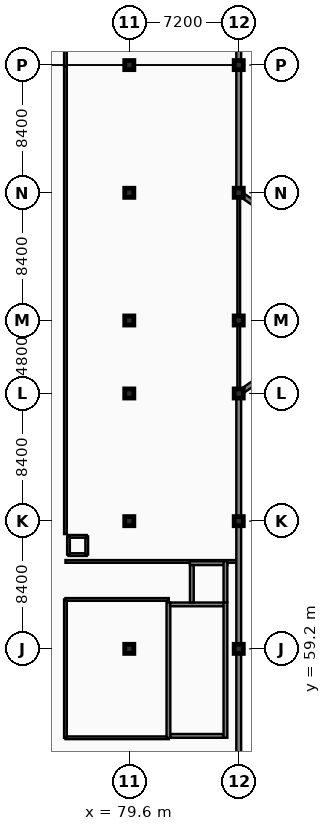
"""IFC4 building model, lengths in metres.
Left out: names, types, materials, properties, quantities, classifications, styles, units other than length and angle.
Written with IfcOpenShell. Run it as: python <this file> out.ifc"""

import sys

from ifc_helpers import new_model, si_unit, direction, frame, frame_2d, origin, origin_2d, place, context, subcontext, project, spatial, rectangle, extrude, element, fill, save


model = new_model("IFC4")
c1 = context("Model", 3, precision=1e-05, world=origin(), true_north=direction((0.0, 1.0)))
c2 = subcontext(c1, "Body", "Model", "MODEL_VIEW")
j1 = project(units=[si_unit("LENGTHUNIT", "METRE"), si_unit("PLANEANGLEUNIT", "RADIAN")], contexts=[c1])
p1 = place(None, origin())
s1 = spatial("IfcSite", under=j1, at=p1, CompositionType="ELEMENT")
p2 = place(p1, origin())
s2 = spatial("IfcBuilding", under=s1, at=p2, CompositionType="ELEMENT")
p3 = place(p2, origin())
s3 = spatial("IfcBuildingStorey", under=s2, at=p3, CompositionType="ELEMENT", Elevation=0.0)
for number, where, z_axis, x_axis in (
    (1, (79.6, 59.2, 0.0), (0.0, 0.0, 1.0), (1.0, 0.0, 0.0)),
    (2, (79.6, 67.6, 0.0), (0.0, 0.0, 1.0), (1.0, 0.0, 0.0)),
    (3, (79.6, 76.0, 0.0), (0.0, 0.0, 1.0), (1.0, 0.0, 0.0)),
    (4, (79.6, 80.8, 0.0), (0.0, 0.0, 1.0), (1.0, 0.0, 0.0)),
    (5, (79.6, 89.2, 0.0), (0.0, 0.0, 1.0), (1.0, 0.0, 0.0)),
    (6, (79.6, 97.6, 0.0), (0.0, 0.0, 1.0), (1.0, 0.0, 0.0)),
    (7, (86.8, 59.2, 0.0), (0.0, 0.0, 1.0), (1.0, 0.0, 0.0)),
    (8, (86.8, 67.6, 0.0), (0.0, 0.0, 1.0), (1.0, 0.0, 0.0)),
    (9, (86.8, 76.0, 0.0), (0.0, 0.0, 1.0), (1.0, 0.0, 0.0)),
    (10, (86.8, 80.8, 0.0), (0.0, 0.0, 1.0), (1.0, 0.0, 0.0)),
    (11, (86.8, 89.2, 0.0), (0.0, 0.0, 1.0), (1.0, 0.0, 0.0)),
    (12, (86.8, 97.6, 0.0), (0.0, 0.0, 1.0), (1.0, 0.0, 0.0)),
):
    element("IfcColumn", number, at=place(p3, frame(where, z_axis=z_axis, x_axis=x_axis)), inside=s3, PredefinedType="COLUMN", context=c2, shape_type="SweptSolid", body=[
        extrude(rectangle(XDim=0.6, YDim=0.6, at=origin_2d()), origin(), (0.0, 0.0, 1.0), 5.4),
    ])
p4 = place(p3, frame((75.4, 53.35, 0.0), z_axis=(0.0, 0.0, 1.0), x_axis=(1.0, 0.0, 0.0)))
e13 = element("IfcWall", 13, at=p4, inside=s3, PredefinedType="PARTITIONING", context=c2, shape_type="SweptSolid", body=[
    extrude(rectangle(XDim=6.8, YDim=0.18, at=frame_2d((3.4, 0.0))), origin(), (0.0, 0.0, 1.0), 4.64),
])
p5 = place(p3, frame((75.4, 53.35, 0.0), z_axis=(0.0, 0.0, 1.0), x_axis=(0.0, 1.0, 0.0)))
e14 = element("IfcWall", 14, at=p5, inside=s3, PredefinedType="PARTITIONING", context=c2, shape_type="SweptSolid", body=[
    extrude(rectangle(XDim=9.1, YDim=0.18, at=frame_2d((4.55, 0.0))), origin(), (0.0, 0.0, 1.0), 4.54),
])
p6 = place(p5, frame((4.05, 0.0, -0.01)))
e15 = element("IfcOpeningElement", 15, at=p6, cuts=e14, PredefinedType="OPENING", context=c2, shape_type="SweptSolid", body=[
    extrude(rectangle(XDim=1.0, YDim=2.16, at=frame_2d((0.5, 1.08))), frame((0.0, 0.1, 0.0), z_axis=(0.0, -1.0, 0.0), x_axis=(1.0, 0.0, 0.0)), (0.0, 0.0, 1.0), 0.2),
])
p7 = place(p3, frame((75.4, 62.45, 0.0), z_axis=(0.0, 0.0, 1.0), x_axis=(1.0, 0.0, 0.0)))
e16 = element("IfcWall", 16, at=p7, inside=s3, PredefinedType="PARTITIONING", context=c2, shape_type="SweptSolid", body=[
    extrude(rectangle(XDim=6.8, YDim=0.18, at=frame_2d((3.4, 0.0))), origin(), (0.0, 0.0, 1.0), 4.64),
])
p8 = place(p3, frame((75.4, 64.95, 0.0), z_axis=(0.0, 0.0, 1.0), x_axis=(1.0, 0.0, 0.0)))
e17 = element("IfcWall", 17, at=p8, inside=s3, PredefinedType="PARTITIONING", context=c2, shape_type="SweptSolid", body=[
    extrude(rectangle(XDim=11.25, YDim=0.18, at=frame_2d((5.625, 0.0))), origin(), (0.0, 0.0, 1.0), 4.64),
])
p9 = place(p3, frame((75.4, 66.75, 0.0), z_axis=(0.0, 0.0, 1.0), x_axis=(0.0, 1.0, 0.0)))
e18 = element("IfcWall", 18, at=p9, inside=s3, PredefinedType="PARTITIONING", context=c2, shape_type="SweptSolid", body=[
    extrude(rectangle(XDim=30.75, YDim=0.18, at=frame_2d((15.375, 0.0))), origin(), (0.0, 0.0, 1.0), 4.54),
])
p10 = place(p9, frame((6.413, 0.0, -0.01)))
e19 = element("IfcOpeningElement", 19, at=p10, cuts=e18, PredefinedType="OPENING", context=c2, shape_type="SweptSolid", body=[
    extrude(rectangle(XDim=1.6, YDim=2.21, at=frame_2d((0.8, 1.105))), frame((0.0, 0.1, 0.0), z_axis=(0.0, -1.0, 0.0), x_axis=(1.0, 0.0, 0.0)), (0.0, 0.0, 1.0), 0.2),
])
p11 = place(p3, frame((75.4, 97.5, 0.0), z_axis=(0.0, 0.0, 1.0), x_axis=(0.0, 1.0, 0.0)))
e20 = element("IfcWall", 20, at=p11, inside=s3, PredefinedType="PARTITIONING", context=c2, shape_type="SweptSolid", body=[
    extrude(rectangle(XDim=8.35, YDim=0.18, at=frame_2d((4.175, 0.0))), origin(), (0.0, 0.0, 1.0), 4.54),
])
p12 = place(p3, frame((86.8, 76.0, 0.0), z_axis=(0.0, 0.0, 1.0), x_axis=(0.0, 1.0, 0.0)))
e21 = element("IfcWall", 21, at=p12, inside=s3, PredefinedType="PARTITIONING", context=c2, shape_type="SweptSolid", body=[
    extrude(rectangle(XDim=13.2, YDim=0.18, at=frame_2d((6.6, 0.0))), origin(), (0.0, 0.0, 1.0), 4.54),
])
p13 = place(p12, frame((5.8, 0.0, -0.01)))
e22 = element("IfcOpeningElement", 22, at=p13, cuts=e21, PredefinedType="OPENING", context=c2, shape_type="SweptSolid", body=[
    extrude(rectangle(XDim=1.6, YDim=2.21, at=frame_2d((0.8, 1.105))), frame((0.0, 0.1, 0.0), z_axis=(0.0, -1.0, 0.0), x_axis=(1.0, 0.0, 0.0)), (0.0, 0.0, 1.0), 0.2),
])
p14 = place(p3, frame((86.8, 97.6, 0.0), z_axis=(0.0, 0.0, 1.0), x_axis=(0.0, 1.0, 0.0)))
e23 = element("IfcWall", 23, at=p14, inside=s3, PredefinedType="SOLIDWALL", context=c2, shape_type="SweptSolid", body=[
    extrude(rectangle(XDim=8.4, YDim=0.32, at=frame_2d((4.2, 0.0))), origin(), (0.0, 0.0, 1.0), 4.54),
])
p15 = place(p14, frame((0.46, 0.0, 0.9)))
e24 = element("IfcOpeningElement", 24, at=p15, cuts=e23, PredefinedType="OPENING", context=c2, shape_type="SweptSolid", body=[
    extrude(rectangle(XDim=2.4, YDim=2.35, at=frame_2d((1.2, 1.175))), frame((0.0, 0.17, 0.0), z_axis=(0.0, -1.0, 0.0), x_axis=(1.0, 0.0, 0.0)), (0.0, 0.0, 1.0), 0.34),
])
p16 = place(p14, frame((5.46, 0.0, 0.9)))
e25 = element("IfcOpeningElement", 25, at=p16, cuts=e23, PredefinedType="OPENING", context=c2, shape_type="SweptSolid", body=[
    extrude(rectangle(XDim=2.4, YDim=2.35, at=frame_2d((1.2, 1.175))), frame((0.0, 0.17, 0.0), z_axis=(0.0, -1.0, 0.0), x_axis=(1.0, 0.0, 0.0)), (0.0, 0.0, 1.0), 0.34),
])
p17 = place(p3, frame((86.8, 50.8, 0.0), z_axis=(0.0, 0.0, 1.0), x_axis=(0.0, 1.0, 0.0)))
e26 = element("IfcWall", 26, at=p17, inside=s3, PredefinedType="SOLIDWALL", context=c2, shape_type="SweptSolid", body=[
    extrude(rectangle(XDim=8.4, YDim=0.32, at=frame_2d((4.2, 0.0))), origin(), (0.0, 0.0, 1.0), 4.64),
])
p18 = place(p17, frame((0.46, 0.0, 0.9)))
e27 = element("IfcOpeningElement", 27, at=p18, cuts=e26, PredefinedType="OPENING", context=c2, shape_type="SweptSolid", body=[
    extrude(rectangle(XDim=2.4, YDim=2.35, at=frame_2d((1.2, 1.175))), frame((0.0, 0.17, 0.0), z_axis=(0.0, -1.0, 0.0), x_axis=(1.0, 0.0, 0.0)), (0.0, 0.0, 1.0), 0.34),
])
p19 = place(p17, frame((5.46, 0.0, 0.9)))
e28 = element("IfcOpeningElement", 28, at=p19, cuts=e26, PredefinedType="OPENING", context=c2, shape_type="SweptSolid", body=[
    extrude(rectangle(XDim=2.4, YDim=2.35, at=frame_2d((1.2, 1.175))), frame((0.0, 0.17, 0.0), z_axis=(0.0, -1.0, 0.0), x_axis=(1.0, 0.0, 0.0)), (0.0, 0.0, 1.0), 0.34),
])
p20 = place(p3, frame((86.8, 59.2, 0.0), z_axis=(0.0, 0.0, 1.0), x_axis=(0.0, 1.0, 0.0)))
e29 = element("IfcWall", 29, at=p20, inside=s3, PredefinedType="SOLIDWALL", context=c2, shape_type="SweptSolid", body=[
    extrude(rectangle(XDim=8.4, YDim=0.32, at=frame_2d((4.2, 0.0))), origin(), (0.0, 0.0, 1.0), 4.54),
])
p21 = place(p20, frame((1.86, 0.0, 0.9)))
e30 = element("IfcOpeningElement", 30, at=p21, cuts=e29, PredefinedType="OPENING", context=c2, shape_type="SweptSolid", body=[
    extrude(rectangle(XDim=2.4, YDim=2.35, at=frame_2d((1.2, 1.175))), frame((0.0, 0.17, 0.0), z_axis=(0.0, -1.0, 0.0), x_axis=(1.0, 0.0, 0.0)), (0.0, 0.0, 1.0), 0.34),
])
p22 = place(p3, frame((86.8, 67.6, 0.0), z_axis=(0.0, 0.0, 1.0), x_axis=(0.0, 1.0, 0.0)))
e31 = element("IfcWall", 31, at=p22, inside=s3, PredefinedType="SOLIDWALL", context=c2, shape_type="SweptSolid", body=[
    extrude(rectangle(XDim=8.4, YDim=0.32, at=frame_2d((4.2, 0.0))), origin(), (0.0, 0.0, 1.0), 4.54),
])
p23 = place(p22, frame((0.46, 0.0, 0.9)))
e32 = element("IfcOpeningElement", 32, at=p23, cuts=e31, PredefinedType="OPENING", context=c2, shape_type="SweptSolid", body=[
    extrude(rectangle(XDim=2.4, YDim=2.35, at=frame_2d((1.2, 1.175))), frame((0.0, 0.17, 0.0), z_axis=(0.0, -1.0, 0.0), x_axis=(1.0, 0.0, 0.0)), (0.0, 0.0, 1.0), 0.34),
])
p24 = place(p22, frame((5.46, 0.0, 0.9)))
e33 = element("IfcOpeningElement", 33, at=p24, cuts=e31, PredefinedType="OPENING", context=c2, shape_type="SweptSolid", body=[
    extrude(rectangle(XDim=2.4, YDim=2.35, at=frame_2d((1.2, 1.175))), frame((0.0, 0.17, 0.0), z_axis=(0.0, -1.0, 0.0), x_axis=(1.0, 0.0, 0.0)), (0.0, 0.0, 1.0), 0.34),
])
p25 = place(p3, frame((86.8, 89.2, 0.0), z_axis=(0.0, 0.0, 1.0), x_axis=(0.0, 1.0, 0.0)))
e34 = element("IfcWall", 34, at=p25, inside=s3, PredefinedType="SOLIDWALL", context=c2, shape_type="SweptSolid", body=[
    extrude(rectangle(XDim=8.4, YDim=0.32, at=frame_2d((4.2, 0.0))), origin(), (0.0, 0.0, 1.0), 4.54),
])
p26 = place(p25, frame((0.46, 0.0, 0.9)))
e35 = element("IfcOpeningElement", 35, at=p26, cuts=e34, PredefinedType="OPENING", context=c2, shape_type="SweptSolid", body=[
    extrude(rectangle(XDim=2.4, YDim=2.35, at=frame_2d((1.2, 1.175))), frame((0.0, 0.17, 0.0), z_axis=(0.0, -1.0, 0.0), x_axis=(1.0, 0.0, 0.0)), (0.0, 0.0, 1.0), 0.34),
])
p27 = place(p25, frame((5.46, 0.0, 0.9)))
e36 = element("IfcOpeningElement", 36, at=p27, cuts=e34, PredefinedType="OPENING", context=c2, shape_type="SweptSolid", body=[
    extrude(rectangle(XDim=2.4, YDim=2.35, at=frame_2d((1.2, 1.175))), frame((0.0, 0.17, 0.0), z_axis=(0.0, -1.0, 0.0), x_axis=(1.0, 0.0, 0.0)), (0.0, 0.0, 1.0), 0.34),
])
p28 = place(p3, frame((86.8, 76.0, 0.0), z_axis=(0.0, 0.0, 1.0), x_axis=(0.8221699556, 0.569242096219, 0.0)))
e37 = element("IfcWall", 37, at=p28, inside=s3, PredefinedType="SOLIDWALL", context=c2, shape_type="SweptSolid", body=[
    extrude(rectangle(XDim=3.162, YDim=0.32, at=frame_2d((1.581, 0.0))), origin(), (0.0, 0.0, 1.0), 4.54),
])
p29 = place(p28, frame((1.06, 0.0, 0.9)))
e38 = element("IfcOpeningElement", 38, at=p29, cuts=e37, PredefinedType="OPENING", context=c2, shape_type="SweptSolid", body=[
    extrude(rectangle(XDim=1.2, YDim=2.35, at=frame_2d((0.6, 1.175))), frame((0.0, 0.17, 0.0), z_axis=(0.0, -1.0, 0.0), x_axis=(1.0, 0.0, 0.0)), (0.0, 0.0, 1.0), 0.34),
])
p30 = place(p3, frame((89.4, 87.4, 0.0), z_axis=(0.0, 0.0, 1.0), x_axis=(-0.8221699556, 0.569242096219, 0.0)))
e39 = element("IfcWall", 39, at=p30, inside=s3, PredefinedType="SOLIDWALL", context=c2, shape_type="SweptSolid", body=[
    extrude(rectangle(XDim=3.162, YDim=0.32, at=frame_2d((1.581, 0.0))), origin(), (0.0, 0.0, 1.0), 4.54),
])
p31 = place(p30, frame((1.06, 0.0, 0.9)))
e40 = element("IfcOpeningElement", 40, at=p31, cuts=e39, PredefinedType="OPENING", context=c2, shape_type="SweptSolid", body=[
    extrude(rectangle(XDim=1.2, YDim=2.35, at=frame_2d((0.6, 1.175))), frame((0.0, 0.17, 0.0), z_axis=(0.0, -1.0, 0.0), x_axis=(1.0, 0.0, 0.0)), (0.0, 0.0, 1.0), 0.34),
])
p32 = place(p3, frame((82.3, 53.475, 0.0), z_axis=(0.0, 0.0, 1.0), x_axis=(1.0, 0.0, 0.0)))
e41 = element("IfcWall", 41, at=p32, inside=s3, PredefinedType="SHEAR", context=c2, shape_type="SweptSolid", body=[
    extrude(rectangle(XDim=3.5, YDim=0.25, at=frame_2d((1.75, 0.0))), origin(), (0.0, 0.0, 1.0), 5.4),
])
p33 = place(p32, frame((1.1, 0.0, -0.01)))
e42 = element("IfcOpeningElement", 42, at=p33, cuts=e41, PredefinedType="OPENING", context=c2, shape_type="SweptSolid", body=[
    extrude(rectangle(XDim=1.3, YDim=2.16, at=frame_2d((0.65, 1.08))), frame((0.0, 0.135, 0.0), z_axis=(0.0, -1.0, 0.0), x_axis=(1.0, 0.0, 0.0)), (0.0, 0.0, 1.0), 0.27),
])
p34 = place(p3, frame((82.175, 53.35, 0.0), z_axis=(0.0, 0.0, 1.0), x_axis=(0.0, 1.0, 0.0)))
e43 = element("IfcWall", 43, at=p34, inside=s3, PredefinedType="SHEAR", context=c2, shape_type="SweptSolid", body=[
    extrude(rectangle(XDim=8.9, YDim=0.25, at=frame_2d((4.45, 0.0))), origin(), (0.0, 0.0, 1.0), 5.4),
])
p35 = place(p3, frame((85.8, 62.125, 0.0), z_axis=(0.0, 0.0, 1.0), x_axis=(-1.0, 0.0, 0.0)))
e44 = element("IfcWall", 44, at=p35, inside=s3, PredefinedType="SHEAR", context=c2, shape_type="SweptSolid", body=[
    extrude(rectangle(XDim=3.5, YDim=0.25, at=frame_2d((1.75, 0.0))), origin(), (0.0, 0.0, 1.0), 5.4),
])
p36 = place(p3, frame((85.925, 53.35, 0.0), z_axis=(0.0, 0.0, 1.0), x_axis=(0.0, 1.0, 0.0)))
e45 = element("IfcWall", 45, at=p36, inside=s3, PredefinedType="SHEAR", context=c2, shape_type="SweptSolid", body=[
    extrude(rectangle(XDim=8.9, YDim=0.25, at=frame_2d((4.45, 0.0))), origin(), (0.0, 0.0, 1.0), 5.4),
])
p37 = place(p3, frame((83.59, 64.835, 0.0), z_axis=(0.0, 0.0, 1.0), x_axis=(1.0, 0.0, 0.0)))
e46 = element("IfcWall", 46, at=p37, inside=s3, PredefinedType="SHEAR", context=c2, shape_type="SweptSolid", body=[
    extrude(rectangle(XDim=2.46, YDim=0.25, at=frame_2d((1.23, 0.0))), origin(), (0.0, 0.0, 1.0), 5.4),
])
p38 = place(p3, frame((83.715, 62.25, 0.0), z_axis=(0.0, 0.0, 1.0), x_axis=(0.0, 1.0, 0.0)))
e47 = element("IfcWall", 47, at=p38, inside=s3, PredefinedType="SHEAR", context=c2, shape_type="SweptSolid", body=[
    extrude(rectangle(XDim=2.46, YDim=0.25, at=frame_2d((1.23, 0.0))), origin(), (0.0, 0.0, 1.0), 5.4),
])
p39 = place(p38, frame((0.68, 0.0, -0.01)))
e48 = element("IfcOpeningElement", 48, at=p39, cuts=e47, PredefinedType="OPENING", context=c2, shape_type="SweptSolid", body=[
    extrude(rectangle(XDim=1.1, YDim=2.16, at=frame_2d((0.55, 1.08))), frame((0.0, 0.135, 0.0), z_axis=(0.0, -1.0, 0.0), x_axis=(1.0, 0.0, 0.0)), (0.0, 0.0, 1.0), 0.27),
])
p40 = place(p3, frame((85.925, 62.25, 0.0), z_axis=(0.0, 0.0, 1.0), x_axis=(0.0, 1.0, 0.0)))
e49 = element("IfcWall", 49, at=p40, inside=s3, PredefinedType="SHEAR", context=c2, shape_type="SweptSolid", body=[
    extrude(rectangle(XDim=2.71, YDim=0.25, at=frame_2d((1.355, 0.0))), origin(), (0.0, 0.0, 1.0), 5.4),
])
p41 = place(p3, frame((75.6, 65.4, 0.0), z_axis=(0.0, 0.0, 1.0), x_axis=(1.0, 0.0, 0.0)))
e50 = element("IfcWall", 50, at=p41, inside=s3, PredefinedType="SOLIDWALL", context=c2, shape_type="SweptSolid", body=[
    extrude(rectangle(XDim=1.2, YDim=0.18, at=frame_2d((0.6, 0.0))), origin(), (0.0, 0.0, 1.0), 5.07),
])
p42 = place(p3, frame((76.8, 65.4, 0.0), z_axis=(0.0, 0.0, 1.0), x_axis=(0.0, 1.0, 0.0)))
e51 = element("IfcWall", 51, at=p42, inside=s3, PredefinedType="SOLIDWALL", context=c2, shape_type="SweptSolid", body=[
    extrude(rectangle(XDim=1.2, YDim=0.18, at=frame_2d((0.6, 0.0))), origin(), (0.0, 0.0, 1.0), 5.07),
])
p43 = place(p3, frame((76.8, 66.6, 0.0), z_axis=(0.0, 0.0, 1.0), x_axis=(-1.0, 0.0, 0.0)))
e52 = element("IfcWall", 52, at=p43, inside=s3, PredefinedType="SOLIDWALL", context=c2, shape_type="SweptSolid", body=[
    extrude(rectangle(XDim=1.2, YDim=0.18, at=frame_2d((0.6, 0.0))), origin(), (0.0, 0.0, 1.0), 5.07),
])
p44 = place(p3, frame((75.6, 66.6, 0.0), z_axis=(0.0, 0.0, 1.0), x_axis=(0.0, -1.0, 0.0)))
e53 = element("IfcWall", 53, at=p44, inside=s3, PredefinedType="SOLIDWALL", context=c2, shape_type="SweptSolid", body=[
    extrude(rectangle(XDim=1.2, YDim=0.18, at=frame_2d((0.6, 0.0))), origin(), (0.0, 0.0, 1.0), 5.07),
])
p45 = place(p44, frame((0.2, 0.0, -0.01)))
e54 = element("IfcOpeningElement", 54, at=p45, cuts=e53, PredefinedType="OPENING", context=c2, shape_type="SweptSolid", body=[
    extrude(rectangle(XDim=0.8, YDim=2.06, at=frame_2d((0.4, 1.03))), frame((0.0, 0.1, 0.0), z_axis=(0.0, -1.0, 0.0), x_axis=(1.0, 0.0, 0.0)), (0.0, 0.0, 1.0), 0.2),
])
p46 = place(p6, frame((0.0, 0.0, 0.01)))
e55 = element("IfcDoor", 55, at=p46, inside=s3, OperationType="SINGLE_SWING_RIGHT", PredefinedType="DOOR", context=c2, shape_type="SweptSolid", body=[
    extrude(rectangle(XDim=1.0, YDim=2.15, at=frame_2d((0.5, 1.075))), frame((0.0, 0.025, 0.0), z_axis=(0.0, -1.0, 0.0), x_axis=(1.0, 0.0, 0.0)), (0.0, 0.0, 1.0), 0.05),
])
fill(e15, e55)
p47 = place(p10, frame((1.6, 0.0, 0.01), z_axis=(0.0, 0.0, 1.0), x_axis=(-1.0, 0.0, 0.0)))
e56 = element("IfcDoor", 56, at=p47, inside=s3, OperationType="DOUBLE_SWING_LEFT", PredefinedType="DOOR", context=c2, shape_type="SweptSolid", body=[
    extrude(rectangle(XDim=1.6, YDim=2.2, at=frame_2d((0.8, 1.1))), frame((0.0, 0.025, 0.0), z_axis=(0.0, -1.0, 0.0), x_axis=(1.0, 0.0, 0.0)), (0.0, 0.0, 1.0), 0.05),
])
fill(e19, e56)
p48 = place(p13, frame((0.0, 0.0, 0.01)))
e57 = element("IfcDoor", 57, at=p48, inside=s3, OperationType="DOUBLE_SWING_LEFT", PredefinedType="DOOR", context=c2, shape_type="SweptSolid", body=[
    extrude(rectangle(XDim=1.6, YDim=2.2, at=frame_2d((0.8, 1.1))), frame((0.0, 0.025, 0.0), z_axis=(0.0, -1.0, 0.0), x_axis=(1.0, 0.0, 0.0)), (0.0, 0.0, 1.0), 0.05),
])
fill(e22, e57)
p49 = place(p15, origin())
e58 = element("IfcWindow", 58, at=p49, inside=s3, PartitioningType="TRIPLE_PANEL_VERTICAL", PredefinedType="WINDOW", context=c2, shape_type="SweptSolid", body=[
    extrude(rectangle(XDim=2.4, YDim=2.35, at=frame_2d((1.2, 1.175))), frame((0.0, 0.03, 0.0), z_axis=(0.0, -1.0, 0.0), x_axis=(1.0, 0.0, 0.0)), (0.0, 0.0, 1.0), 0.06),
])
fill(e24, e58)
p50 = place(p18, origin())
e59 = element("IfcWindow", 59, at=p50, inside=s3, PartitioningType="TRIPLE_PANEL_VERTICAL", PredefinedType="WINDOW", context=c2, shape_type="SweptSolid", body=[
    extrude(rectangle(XDim=2.4, YDim=2.35, at=frame_2d((1.2, 1.175))), frame((0.0, 0.03, 0.0), z_axis=(0.0, -1.0, 0.0), x_axis=(1.0, 0.0, 0.0)), (0.0, 0.0, 1.0), 0.06),
])
fill(e27, e59)
p51 = place(p19, origin())
e60 = element("IfcWindow", 60, at=p51, inside=s3, PartitioningType="TRIPLE_PANEL_VERTICAL", PredefinedType="WINDOW", context=c2, shape_type="SweptSolid", body=[
    extrude(rectangle(XDim=2.4, YDim=2.35, at=frame_2d((1.2, 1.175))), frame((0.0, 0.03, 0.0), z_axis=(0.0, -1.0, 0.0), x_axis=(1.0, 0.0, 0.0)), (0.0, 0.0, 1.0), 0.06),
])
fill(e28, e60)
p52 = place(p21, origin())
e61 = element("IfcWindow", 61, at=p52, inside=s3, PartitioningType="TRIPLE_PANEL_VERTICAL", PredefinedType="WINDOW", context=c2, shape_type="SweptSolid", body=[
    extrude(rectangle(XDim=2.4, YDim=2.35, at=frame_2d((1.2, 1.175))), frame((0.0, 0.03, 0.0), z_axis=(0.0, -1.0, 0.0), x_axis=(1.0, 0.0, 0.0)), (0.0, 0.0, 1.0), 0.06),
])
fill(e30, e61)
p53 = place(p23, origin())
e62 = element("IfcWindow", 62, at=p53, inside=s3, PartitioningType="TRIPLE_PANEL_VERTICAL", PredefinedType="WINDOW", context=c2, shape_type="SweptSolid", body=[
    extrude(rectangle(XDim=2.4, YDim=2.35, at=frame_2d((1.2, 1.175))), frame((0.0, 0.03, 0.0), z_axis=(0.0, -1.0, 0.0), x_axis=(1.0, 0.0, 0.0)), (0.0, 0.0, 1.0), 0.06),
])
fill(e32, e62)
p54 = place(p24, origin())
e63 = element("IfcWindow", 63, at=p54, inside=s3, PartitioningType="TRIPLE_PANEL_VERTICAL", PredefinedType="WINDOW", context=c2, shape_type="SweptSolid", body=[
    extrude(rectangle(XDim=2.4, YDim=2.35, at=frame_2d((1.2, 1.175))), frame((0.0, 0.03, 0.0), z_axis=(0.0, -1.0, 0.0), x_axis=(1.0, 0.0, 0.0)), (0.0, 0.0, 1.0), 0.06),
])
fill(e33, e63)
p55 = place(p26, origin())
e64 = element("IfcWindow", 64, at=p55, inside=s3, PartitioningType="TRIPLE_PANEL_VERTICAL", PredefinedType="WINDOW", context=c2, shape_type="SweptSolid", body=[
    extrude(rectangle(XDim=2.4, YDim=2.35, at=frame_2d((1.2, 1.175))), frame((0.0, 0.03, 0.0), z_axis=(0.0, -1.0, 0.0), x_axis=(1.0, 0.0, 0.0)), (0.0, 0.0, 1.0), 0.06),
])
fill(e35, e64)
p56 = place(p27, origin())
e65 = element("IfcWindow", 65, at=p56, inside=s3, PartitioningType="TRIPLE_PANEL_VERTICAL", PredefinedType="WINDOW", context=c2, shape_type="SweptSolid", body=[
    extrude(rectangle(XDim=2.4, YDim=2.35, at=frame_2d((1.2, 1.175))), frame((0.0, 0.03, 0.0), z_axis=(0.0, -1.0, 0.0), x_axis=(1.0, 0.0, 0.0)), (0.0, 0.0, 1.0), 0.06),
])
fill(e36, e65)
p57 = place(p31, origin())
e66 = element("IfcWindow", 66, at=p57, inside=s3, PartitioningType="SINGLE_PANEL", PredefinedType="WINDOW", context=c2, shape_type="SweptSolid", body=[
    extrude(rectangle(XDim=1.2, YDim=2.35, at=frame_2d((0.6, 1.175))), frame((0.0, 0.03, 0.0), z_axis=(0.0, -1.0, 0.0), x_axis=(1.0, 0.0, 0.0)), (0.0, 0.0, 1.0), 0.06),
])
fill(e40, e66)
p58 = place(p33, frame((0.0, 0.0, 0.01)))
e67 = element("IfcDoor", 67, at=p58, inside=s3, OperationType="SINGLE_SWING_RIGHT", PredefinedType="DOOR", context=c2, shape_type="SweptSolid", body=[
    extrude(rectangle(XDim=1.3, YDim=2.15, at=frame_2d((0.65, 1.075))), frame((0.0, 0.025, 0.0), z_axis=(0.0, -1.0, 0.0), x_axis=(1.0, 0.0, 0.0)), (0.0, 0.0, 1.0), 0.05),
])
fill(e42, e67)
p59 = place(p39, frame((0.0, 0.0, 0.01)))
e68 = element("IfcDoor", 68, at=p59, inside=s3, OperationType="SLIDING_TO_LEFT", PredefinedType="DOOR", context=c2, shape_type="SweptSolid", body=[
    extrude(rectangle(XDim=1.1, YDim=2.15, at=frame_2d((0.55, 1.075))), frame((0.0, 0.025, 0.0), z_axis=(0.0, -1.0, 0.0), x_axis=(1.0, 0.0, 0.0)), (0.0, 0.0, 1.0), 0.05),
])
fill(e48, e68)
p60 = place(p45, frame((0.0, 0.0, 0.01)))
e69 = element("IfcDoor", 69, at=p60, inside=s3, OperationType="SINGLE_SWING_LEFT", PredefinedType="DOOR", context=c2, shape_type="SweptSolid", body=[
    extrude(rectangle(XDim=0.8, YDim=2.05, at=frame_2d((0.4, 1.025))), frame((0.0, 0.025, 0.0), z_axis=(0.0, -1.0, 0.0), x_axis=(1.0, 0.0, 0.0)), (0.0, 0.0, 1.0), 0.05),
])
fill(e54, e69)
save(model, sys.argv[1])
